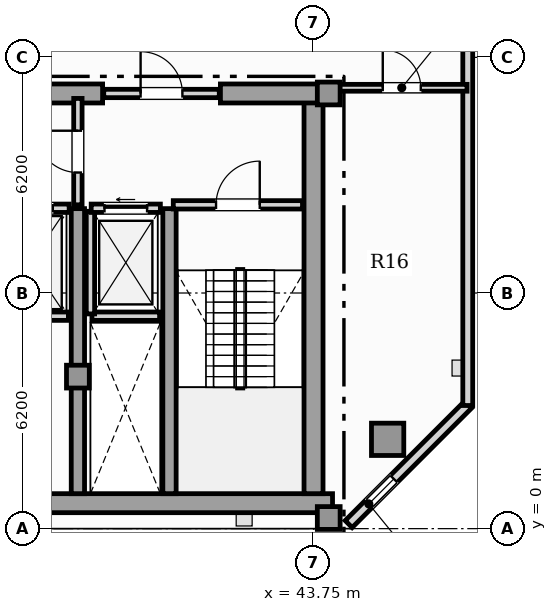
"""IFC4 building model, lengths in metres.
Left out: names, types, materials, properties, quantities, classifications, styles, units other than length and angle.
Written with IfcOpenShell. Run it as: python <this file> out.ifc"""

import sys

from ifc_helpers import new_model, si_unit, direction, frame, frame_2d, origin, origin_2d, place, context, subcontext, project, spatial, rectangle, hollow_rectangle, extrude, element, fill, save


model = new_model("IFC4")
c1 = context("Model", 3, precision=1e-05, world=origin(), true_north=direction((0.0, 1.0)))
c2 = subcontext(c1, "Body", "Model", "MODEL_VIEW")
j1 = project(units=[si_unit("LENGTHUNIT", "METRE"), si_unit("PLANEANGLEUNIT", "RADIAN")], contexts=[c1])
p1 = place(None, origin())
s1 = spatial("IfcSite", under=j1, at=p1, CompositionType="ELEMENT")
p2 = place(p1, origin())
s2 = spatial("IfcBuilding", under=s1, at=p2, CompositionType="ELEMENT")
p3 = place(p2, frame((0.0, 0.0, 349.05)))
s3 = spatial("IfcBuildingStorey", under=s2, at=p3, CompositionType="ELEMENT", Elevation=349.05)
p4 = place(p3, frame((13.25, 0.67, 0.0), z_axis=(0.0, 0.0, 1.0), x_axis=(1.0, 0.0, 0.0)))
e1 = element("IfcWall", 1, at=p4, inside=s3, PredefinedType="SHEAR", context=c2, shape_type="SweptSolid", body=[
    extrude(rectangle(XDim=31.0, YDim=0.5, at=frame_2d((15.5, 0.0))), origin(), (0.0, 0.0, 1.0), 4.14),
])
p5 = place(p3, frame((43.75, 0.92, 0.0), z_axis=(0.0, 0.0, 1.0), x_axis=(0.0, 1.0, 0.0)))
e2 = element("IfcWall", 2, at=p5, inside=s3, PredefinedType="SHEAR", context=c2, shape_type="SweptSolid", body=[
    extrude(rectangle(XDim=10.53, YDim=0.5, at=frame_2d((5.265, 0.0))), origin(), (0.0, 0.0, 1.0), 4.14),
])
p6 = place(p3, frame((30.9, 11.45, 0.0), z_axis=(0.0, 0.0, 1.0), x_axis=(1.0, 0.0, 0.0)))
e3 = element("IfcWall", 3, at=p6, inside=s3, PredefinedType="SHEAR", context=c2, shape_type="SweptSolid", body=[
    extrude(rectangle(XDim=7.3, YDim=0.5, at=frame_2d((3.65, 0.0))), origin(), (0.0, 0.0, 1.0), 4.14),
])
p7 = place(p3, frame((41.3, 11.45, 0.0), z_axis=(0.0, 0.0, 1.0), x_axis=(1.0, 0.0, 0.0)))
e4 = element("IfcWall", 4, at=p7, inside=s3, PredefinedType="SHEAR", context=c2, shape_type="SweptSolid", body=[
    extrude(rectangle(XDim=2.95, YDim=0.5, at=frame_2d((1.475, 0.0))), origin(), (0.0, 0.0, 1.0), 4.14),
])
for number, where, z_axis, x_axis in (
    (5, (37.55, 0.92, 0.0), (0.0, 0.0, 1.0), (0.0, 1.0, 0.0)),
    (6, (39.96, 0.92, 0.0), (0.0, 0.0, 1.0), (0.0, 1.0, 0.0)),
):
    element("IfcWall", number, at=place(p3, frame(where, z_axis=z_axis, x_axis=x_axis)), inside=s3, PredefinedType="SHEAR", context=c2, shape_type="SweptSolid", body=[
        extrude(rectangle(XDim=7.5, YDim=0.35, at=frame_2d((3.75, 0.0))), origin(), (0.0, 0.0, 1.0), 4.14),
    ])
for number, where, z_axis, x_axis in (
    (7, (44.15, 0.28, 0.0), (0.0, 0.0, 1.0), (1.0, 0.0, 0.0)),
    (8, (44.15, 11.45, 0.0), (0.0, 0.0, 1.0), (1.0, 0.0, 0.0)),
    (9, (37.55, 4.0, 0.0), (0.0, 0.0, 1.0), (1.0, 0.0, 0.0)),
):
    element("IfcColumn", number, at=place(p3, frame(where, z_axis=z_axis, x_axis=x_axis)), inside=s3, PredefinedType="COLUMN", context=c2, shape_type="SweptSolid", body=[
        extrude(rectangle(XDim=0.6, YDim=0.6, at=origin_2d()), origin(), (0.0, 0.0, 1.0), 4.4),
    ])
p8 = place(p3, frame((45.7, 2.35, 0.0), z_axis=(0.0, 0.0, 1.0), x_axis=(1.0, 0.0, 0.0)))
e10 = element("IfcColumn", 10, at=p8, inside=s3, PredefinedType="USERDEFINED", context=c2, shape_type="SweptSolid", body=[
    extrude(hollow_rectangle(XDim=0.85, YDim=0.85, WallThickness=0.05, at=origin_2d()), origin(), (0.0, 0.0, 1.0), 4.4),
])
p9 = place(p3, frame((44.675, 0.12, 0.0), z_axis=(0.0, 0.0, 1.0), x_axis=(0.707079321262, 0.707134240044, 0.0)))
e11 = element("IfcWall", 11, at=p9, inside=s3, PredefinedType="SOLIDWALL", context=c2, shape_type="SweptSolid", body=[
    extrude(rectangle(XDim=4.446, YDim=0.26, at=frame_2d((2.223, 0.0))), origin(), (0.0, 0.0, 1.0), 4.14),
])
p10 = place(p9, frame((0.78, 0.0, 0.95)))
e12 = element("IfcOpeningElement", 12, at=p10, cuts=e11, PredefinedType="OPENING", context=c2, shape_type="SweptSolid", body=[
    extrude(rectangle(XDim=0.9, YDim=1.5, at=frame_2d((0.45, 0.75))), frame((0.0, 0.14, 0.0), z_axis=(0.0, -1.0, 0.0), x_axis=(1.0, 0.0, 0.0)), (0.0, 0.0, 1.0), 0.28),
])
p11 = place(p3, frame((47.808, 3.24, 0.0), z_axis=(0.0, 0.0, 1.0), x_axis=(0.0, 1.0, 0.0)))
e13 = element("IfcWall", 13, at=p11, inside=s3, PredefinedType="SOLIDWALL", context=c2, shape_type="SweptSolid", body=[
    extrude(rectangle(XDim=24.757, YDim=0.26, at=frame_2d((12.378, 0.0))), origin(), (0.0, 0.0, 1.0), 4.14),
])
p12 = place(p11, frame((21.027, 0.0, 0.95)))
e14 = element("IfcOpeningElement", 14, at=p12, cuts=e13, PredefinedType="OPENING", context=c2, shape_type="SweptSolid", body=[
    extrude(rectangle(XDim=0.9, YDim=1.5, at=frame_2d((0.45, 0.75))), frame((0.0, 0.14, 0.0), z_axis=(0.0, -1.0, 0.0), x_axis=(1.0, 0.0, 0.0)), (0.0, 0.0, 1.0), 0.28),
])
p13 = place(p11, frame((10.461, 0.0, 0.9)))
e15 = element("IfcOpeningElement", 15, at=p13, cuts=e13, PredefinedType="OPENING", context=c2, shape_type="SweptSolid", body=[
    extrude(rectangle(XDim=1.5, YDim=1.95, at=frame_2d((0.75, 0.975))), frame((0.0, 0.14, 0.0), z_axis=(0.0, -1.0, 0.0), x_axis=(1.0, 0.0, 0.0)), (0.0, 0.0, 1.0), 0.28),
])
p14 = place(p11, frame((13.724, 0.0, 0.9)))
e16 = element("IfcOpeningElement", 16, at=p14, cuts=e13, PredefinedType="OPENING", context=c2, shape_type="SweptSolid", body=[
    extrude(rectangle(XDim=1.5, YDim=1.95, at=frame_2d((0.75, 0.975))), frame((0.0, 0.14, 0.0), z_axis=(0.0, -1.0, 0.0), x_axis=(1.0, 0.0, 0.0)), (0.0, 0.0, 1.0), 0.28),
])
p15 = place(p11, frame((17.852, 0.0, 0.9)))
e17 = element("IfcOpeningElement", 17, at=p15, cuts=e13, PredefinedType="OPENING", context=c2, shape_type="SweptSolid", body=[
    extrude(rectangle(XDim=1.5, YDim=1.95, at=frame_2d((0.75, 0.975))), frame((0.0, 0.14, 0.0), z_axis=(0.0, -1.0, 0.0), x_axis=(1.0, 0.0, 0.0)), (0.0, 0.0, 1.0), 0.28),
])
p16 = place(p11, frame((22.487, 0.0, 0.9)))
e18 = element("IfcOpeningElement", 18, at=p16, cuts=e13, PredefinedType="OPENING", context=c2, shape_type="SweptSolid", body=[
    extrude(rectangle(XDim=1.5, YDim=1.95, at=frame_2d((0.75, 0.975))), frame((0.0, 0.14, 0.0), z_axis=(0.0, -1.0, 0.0), x_axis=(1.0, 0.0, 0.0)), (0.0, 0.0, 1.0), 0.28),
])
p17 = place(p3, frame((37.92, 5.59, 0.0), z_axis=(0.0, 0.0, 1.0), x_axis=(1.0, 0.0, 0.0)))
e19 = element("IfcWall", 19, at=p17, inside=s3, PredefinedType="SOLIDWALL", context=c2, shape_type="SweptSolid", body=[
    extrude(rectangle(XDim=1.78, YDim=0.22, at=frame_2d((0.89, 0.0))), origin(), (0.0, 0.0, 1.0), 4.14),
])
p18 = place(p3, frame((37.88, 5.65, 0.0), z_axis=(0.0, 0.0, 1.0), x_axis=(0.0, 1.0, 0.0)))
e20 = element("IfcWall", 20, at=p18, inside=s3, PredefinedType="SOLIDWALL", context=c2, shape_type="SweptSolid", body=[
    extrude(rectangle(XDim=2.7, YDim=0.22, at=frame_2d((1.35, 0.0))), origin(), (0.0, 0.0, 1.0), 4.14),
])
p19 = place(p3, frame((37.9, 8.43, 0.0), z_axis=(0.0, 0.0, 1.0), x_axis=(1.0, 0.0, 0.0)))
e21 = element("IfcWall", 21, at=p19, inside=s3, PredefinedType="SOLIDWALL", context=c2, shape_type="SweptSolid", body=[
    extrude(rectangle(XDim=1.82, YDim=0.22, at=frame_2d((0.91, 0.0))), origin(), (0.0, 0.0, 1.0), 4.14),
])
p20 = place(p19, frame((0.35, 0.0, 0.0)))
e22 = element("IfcOpeningElement", 22, at=p20, cuts=e21, PredefinedType="OPENING", context=c2, shape_type="SweptSolid", body=[
    extrude(rectangle(XDim=1.12, YDim=2.25, at=frame_2d((0.56, 1.125))), frame((0.0, 0.12, 0.0), z_axis=(0.0, -1.0, 0.0), x_axis=(1.0, 0.0, 0.0)), (0.0, 0.0, 1.0), 0.24),
])
p21 = place(p3, frame((35.3, 5.59, 0.0), z_axis=(0.0, 0.0, 1.0), x_axis=(1.0, 0.0, 0.0)))
e23 = element("IfcWall", 23, at=p21, inside=s3, PredefinedType="SOLIDWALL", context=c2, shape_type="SweptSolid", body=[
    extrude(rectangle(XDim=2.0, YDim=0.22, at=frame_2d((1.0, 0.0))), origin(), (0.0, 0.0, 1.0), 4.14),
])
p22 = place(p3, frame((35.28, 8.43, 0.0), z_axis=(0.0, 0.0, 1.0), x_axis=(1.0, 0.0, 0.0)))
e24 = element("IfcWall", 24, at=p22, inside=s3, PredefinedType="SOLIDWALL", context=c2, shape_type="SweptSolid", body=[
    extrude(rectangle(XDim=2.04, YDim=0.22, at=frame_2d((1.02, 0.0))), origin(), (0.0, 0.0, 1.0), 4.14),
])
p23 = place(p22, frame((0.43, 0.0, 0.0)))
e25 = element("IfcOpeningElement", 25, at=p23, cuts=e24, PredefinedType="OPENING", context=c2, shape_type="SweptSolid", body=[
    extrude(rectangle(XDim=1.18, YDim=2.2, at=frame_2d((0.59, 1.1))), frame((0.0, 0.12, 0.0), z_axis=(0.0, -1.0, 0.0), x_axis=(1.0, 0.0, 0.0)), (0.0, 0.0, 1.0), 0.24),
])
p24 = place(p3, frame((40.06, 8.52, 0.0), z_axis=(0.0, 0.0, 1.0), x_axis=(1.0, 0.0, 0.0)))
e26 = element("IfcWall", 26, at=p24, inside=s3, PredefinedType="SOLIDWALL", context=c2, shape_type="SweptSolid", body=[
    extrude(rectangle(XDim=3.4, YDim=0.22, at=frame_2d((1.7, 0.0))), origin(), (0.0, 0.0, 1.0), 4.14),
])
p25 = place(p24, frame((1.125, 0.0, 0.0)))
e27 = element("IfcOpeningElement", 27, at=p25, cuts=e26, PredefinedType="OPENING", context=c2, shape_type="SweptSolid", body=[
    extrude(rectangle(XDim=1.15, YDim=2.2, at=frame_2d((0.575, 1.1))), frame((0.0, 0.12, 0.0), z_axis=(0.0, -1.0, 0.0), x_axis=(1.0, 0.0, 0.0)), (0.0, 0.0, 1.0), 0.24),
])
p26 = place(p3, frame((37.55, 8.52, 0.0), z_axis=(0.0, 0.0, 1.0), x_axis=(0.0, 1.0, 0.0)))
e28 = element("IfcWall", 28, at=p26, inside=s3, PredefinedType="SOLIDWALL", context=c2, shape_type="SweptSolid", body=[
    extrude(rectangle(XDim=2.8, YDim=0.22, at=frame_2d((1.4, 0.0))), origin(), (0.0, 0.0, 1.0), 3.595),
])
p27 = place(p26, frame((0.85, 0.0, 0.0)))
e29 = element("IfcOpeningElement", 29, at=p27, cuts=e28, PredefinedType="OPENING", context=c2, shape_type="SweptSolid", body=[
    extrude(rectangle(XDim=1.1, YDim=2.2, at=frame_2d((0.55, 1.1))), frame((0.0, 0.12, 0.0), z_axis=(0.0, -1.0, 0.0), x_axis=(1.0, 0.0, 0.0)), (0.0, 0.0, 1.0), 0.24),
])
p28 = place(p3, frame((38.23, 11.45, 0.0), z_axis=(0.0, 0.0, 1.0), x_axis=(1.0, 0.0, 0.0)))
e30 = element("IfcWall", 30, at=p28, inside=s3, PredefinedType="SOLIDWALL", context=c2, shape_type="SweptSolid", body=[
    extrude(rectangle(XDim=3.04, YDim=0.22, at=frame_2d((1.52, 0.0))), origin(), (0.0, 0.0, 1.0), 4.14),
])
p29 = place(p28, frame((0.97, 0.0, 0.0)))
e31 = element("IfcOpeningElement", 31, at=p29, cuts=e30, PredefinedType="OPENING", context=c2, shape_type="SweptSolid", body=[
    extrude(rectangle(XDim=1.1, YDim=2.2, at=frame_2d((0.55, 1.1))), frame((0.0, 0.12, 0.0), z_axis=(0.0, -1.0, 0.0), x_axis=(1.0, 0.0, 0.0)), (0.0, 0.0, 1.0), 0.24),
])
p30 = place(p3, frame((44.355, 11.6, 0.0), z_axis=(0.0, 0.0, 1.0), x_axis=(1.0, 0.0, 0.0)))
e32 = element("IfcWall", 32, at=p30, inside=s3, PredefinedType="PARTITIONING", context=c2, shape_type="SweptSolid", body=[
    extrude(rectangle(XDim=3.434, YDim=0.18, at=frame_2d((1.717, 0.0))), origin(), (0.0, 0.0, 1.0), 4.14),
])
p31 = place(p30, frame((1.217, 0.0, 0.0)))
e33 = element("IfcOpeningElement", 33, at=p31, cuts=e32, PredefinedType="OPENING", context=c2, shape_type="SweptSolid", body=[
    extrude(rectangle(XDim=1.0, YDim=2.15, at=frame_2d((0.5, 1.075))), frame((0.0, 0.1, 0.0), z_axis=(0.0, -1.0, 0.0), x_axis=(1.0, 0.0, 0.0)), (0.0, 0.0, 1.0), 0.2),
])
p32 = place(p10, origin())
e34 = element("IfcWindow", 34, at=p32, inside=s3, PartitioningType="SINGLE_PANEL", PredefinedType="WINDOW", context=c2, shape_type="SweptSolid", body=[
    extrude(rectangle(XDim=0.9, YDim=1.5, at=frame_2d((0.45, 0.75))), frame((0.0, 0.03, 0.0), z_axis=(0.0, -1.0, 0.0), x_axis=(1.0, 0.0, 0.0)), (0.0, 0.0, 1.0), 0.06),
])
fill(e12, e34)
p33 = place(p20, origin())
e35 = element("IfcDoor", 35, at=p33, inside=s3, OperationType="SLIDING_TO_LEFT", PredefinedType="DOOR", context=c2, shape_type="SweptSolid", body=[
    extrude(rectangle(XDim=1.12, YDim=2.25, at=frame_2d((0.56, 1.125))), frame((0.0, 0.025, 0.0), z_axis=(0.0, -1.0, 0.0), x_axis=(1.0, 0.0, 0.0)), (0.0, 0.0, 1.0), 0.05),
])
fill(e22, e35)
p34 = place(p23, origin())
e36 = element("IfcDoor", 36, at=p34, inside=s3, OperationType="SLIDING_TO_RIGHT", PredefinedType="DOOR", context=c2, shape_type="SweptSolid", body=[
    extrude(rectangle(XDim=1.18, YDim=2.2, at=frame_2d((0.59, 1.1))), frame((0.0, 0.025, 0.0), z_axis=(0.0, -1.0, 0.0), x_axis=(1.0, 0.0, 0.0)), (0.0, 0.0, 1.0), 0.05),
])
fill(e25, e36)
p35 = place(p25, origin())
e37 = element("IfcDoor", 37, at=p35, inside=s3, OperationType="SINGLE_SWING_RIGHT", PredefinedType="DOOR", context=c2, shape_type="SweptSolid", body=[
    extrude(rectangle(XDim=1.15, YDim=2.2, at=frame_2d((0.575, 1.1))), frame((0.0, 0.025, 0.0), z_axis=(0.0, -1.0, 0.0), x_axis=(1.0, 0.0, 0.0)), (0.0, 0.0, 1.0), 0.05),
])
fill(e27, e37)
p36 = place(p27, origin())
e38 = element("IfcDoor", 38, at=p36, inside=s3, OperationType="SINGLE_SWING_RIGHT", PredefinedType="DOOR", context=c2, shape_type="SweptSolid", body=[
    extrude(rectangle(XDim=1.1, YDim=2.2, at=frame_2d((0.55, 1.1))), frame((0.0, 0.025, 0.0), z_axis=(0.0, -1.0, 0.0), x_axis=(1.0, 0.0, 0.0)), (0.0, 0.0, 1.0), 0.05),
])
fill(e29, e38)
p37 = place(p29, origin())
e39 = element("IfcDoor", 39, at=p37, inside=s3, OperationType="SINGLE_SWING_LEFT", PredefinedType="DOOR", context=c2, shape_type="SweptSolid", body=[
    extrude(rectangle(XDim=1.1, YDim=2.2, at=frame_2d((0.55, 1.1))), frame((0.0, 0.025, 0.0), z_axis=(0.0, -1.0, 0.0), x_axis=(1.0, 0.0, 0.0)), (0.0, 0.0, 1.0), 0.05),
])
fill(e31, e39)
p38 = place(p31, origin())
e40 = element("IfcDoor", 40, at=p38, inside=s3, OperationType="SINGLE_SWING_LEFT", PredefinedType="DOOR", context=c2, shape_type="SweptSolid", body=[
    extrude(rectangle(XDim=1.0, YDim=2.15, at=frame_2d((0.5, 1.075))), frame((0.0, 0.025, 0.0), z_axis=(0.0, -1.0, 0.0), x_axis=(1.0, 0.0, 0.0)), (0.0, 0.0, 1.0), 0.05),
])
fill(e33, e40)
save(model, sys.argv[1])
